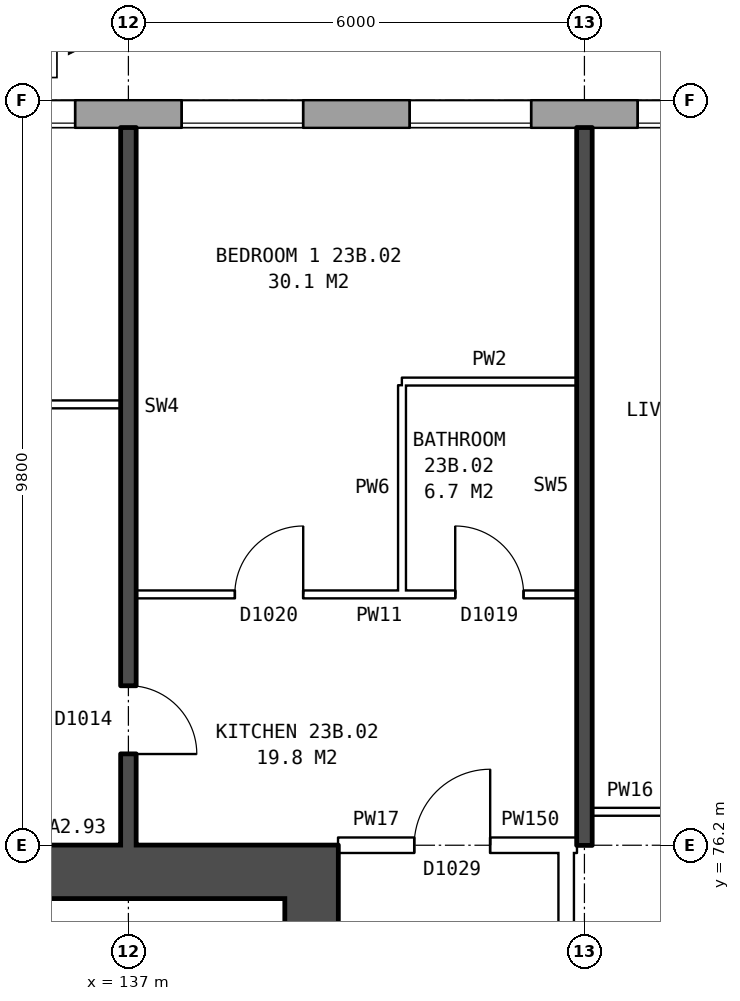
"""IFC4 building model, lengths in metres.
Left out: names, types, materials, properties, quantities, classifications, styles, units other than length and angle.
Written with IfcOpenShell. Run it as: python <this file> out.ifc"""

import sys

from ifc_helpers import new_model, si_unit, direction, frame, frame_2d, origin, place, context, subcontext, project, spatial, rectangle, extrude, element, fill, save


model = new_model("IFC4")
c1 = context("Model", 3, precision=1e-05, world=origin(), true_north=direction((0.0, 1.0)))
c2 = subcontext(c1, "Body", "Model", "MODEL_VIEW")
j1 = project(units=[si_unit("LENGTHUNIT", "METRE"), si_unit("PLANEANGLEUNIT", "RADIAN")], contexts=[c1])
p1 = place(None, origin())
s1 = spatial("IfcSite", under=j1, at=p1, CompositionType="ELEMENT")
p2 = place(p1, origin())
s2 = spatial("IfcBuilding", under=s1, at=p2, CompositionType="ELEMENT")
p3 = place(p2, frame((0.0, 0.0, 84.0)))
s3 = spatial("IfcBuildingStorey", under=s2, at=p3, CompositionType="ELEMENT", Elevation=84.0)
p4 = place(p3, frame((172.175, 85.82, 0.0), z_axis=(0.0, 0.0, 1.0), x_axis=(-1.0, 0.0, 0.0)))
e1 = element("IfcWall", 1, at=p4, inside=s3, PredefinedType="STANDARD", context=c2, shape_type="SweptSolid", body=[
    extrude(rectangle(XDim=38.101, YDim=0.36, at=frame_2d((19.05, 0.0))), origin(), (0.0, 0.0, 1.0), 2.85),
])
p5 = place(p4, frame((2.875, 0.0, 0.8)))
e2 = element("IfcOpeningElement", 2, at=p5, cuts=e1, PredefinedType="OPENING", context=c2, shape_type="SweptSolid", body=[
    extrude(rectangle(XDim=1.6, YDim=1.8, at=frame_2d((0.8, 0.9))), frame((0.0, 0.19, 0.0), z_axis=(0.0, -1.0, 0.0), x_axis=(1.0, 0.0, 0.0)), (0.0, 0.0, 1.0), 0.38),
])
p6 = place(p4, frame((5.875, 0.0, 0.8)))
e3 = element("IfcOpeningElement", 3, at=p6, cuts=e1, PredefinedType="OPENING", context=c2, shape_type="SweptSolid", body=[
    extrude(rectangle(XDim=1.6, YDim=1.8, at=frame_2d((0.8, 0.9))), frame((0.0, 0.19, 0.0), z_axis=(0.0, -1.0, 0.0), x_axis=(1.0, 0.0, 0.0)), (0.0, 0.0, 1.0), 0.38),
])
p7 = place(p4, frame((8.875, 0.0, 0.8)))
e4 = element("IfcOpeningElement", 4, at=p7, cuts=e1, PredefinedType="OPENING", context=c2, shape_type="SweptSolid", body=[
    extrude(rectangle(XDim=1.6, YDim=1.8, at=frame_2d((0.8, 0.9))), frame((0.0, 0.19, 0.0), z_axis=(0.0, -1.0, 0.0), x_axis=(1.0, 0.0, 0.0)), (0.0, 0.0, 1.0), 0.38),
])
p8 = place(p4, frame((11.875, 0.0, 0.8)))
e5 = element("IfcOpeningElement", 5, at=p8, cuts=e1, PredefinedType="OPENING", context=c2, shape_type="SweptSolid", body=[
    extrude(rectangle(XDim=1.6, YDim=1.8, at=frame_2d((0.8, 0.9))), frame((0.0, 0.19, 0.0), z_axis=(0.0, -1.0, 0.0), x_axis=(1.0, 0.0, 0.0)), (0.0, 0.0, 1.0), 0.38),
])
p9 = place(p4, frame((13.775, 0.0, 1.6)))
e6 = element("IfcOpeningElement", 6, at=p9, cuts=e1, PredefinedType="OPENING", context=c2, shape_type="SweptSolid", body=[
    extrude(rectangle(XDim=0.6, YDim=0.9, at=frame_2d((0.3, 0.45))), frame((0.0, 0.19, 0.0), z_axis=(0.0, -1.0, 0.0), x_axis=(1.0, 0.0, 0.0)), (0.0, 0.0, 1.0), 0.38),
])
p10 = place(p4, frame((17.875, 0.0, 0.8)))
e7 = element("IfcOpeningElement", 7, at=p10, cuts=e1, PredefinedType="OPENING", context=c2, shape_type="SweptSolid", body=[
    extrude(rectangle(XDim=1.6, YDim=1.8, at=frame_2d((0.8, 0.9))), frame((0.0, 0.19, 0.0), z_axis=(0.0, -1.0, 0.0), x_axis=(1.0, 0.0, 0.0)), (0.0, 0.0, 1.0), 0.38),
])
p11 = place(p4, frame((20.325, 0.0, 0.65)))
e8 = element("IfcOpeningElement", 8, at=p11, cuts=e1, PredefinedType="OPENING", context=c2, shape_type="SweptSolid", body=[
    extrude(rectangle(XDim=1.4, YDim=1.8, at=frame_2d((0.7, 0.9))), frame((0.0, 0.19, 0.0), z_axis=(0.0, -1.0, 0.0), x_axis=(1.0, 0.0, 0.0)), (0.0, 0.0, 1.0), 0.38),
])
p12 = place(p4, frame((23.625, 0.0, 1.7)))
e9 = element("IfcOpeningElement", 9, at=p12, cuts=e1, PredefinedType="OPENING", context=c2, shape_type="SweptSolid", body=[
    extrude(rectangle(XDim=0.6, YDim=0.9, at=frame_2d((0.3, 0.45))), frame((0.0, 0.19, 0.0), z_axis=(0.0, -1.0, 0.0), x_axis=(1.0, 0.0, 0.0)), (0.0, 0.0, 1.0), 0.38),
])
p13 = place(p4, frame((26.875, 0.0, 0.8)))
e10 = element("IfcOpeningElement", 10, at=p13, cuts=e1, PredefinedType="OPENING", context=c2, shape_type="SweptSolid", body=[
    extrude(rectangle(XDim=1.6, YDim=1.8, at=frame_2d((0.8, 0.9))), frame((0.0, 0.19, 0.0), z_axis=(0.0, -1.0, 0.0), x_axis=(1.0, 0.0, 0.0)), (0.0, 0.0, 1.0), 0.38),
])
p14 = place(p4, frame((29.875, 0.0, 0.8)))
e11 = element("IfcOpeningElement", 11, at=p14, cuts=e1, PredefinedType="OPENING", context=c2, shape_type="SweptSolid", body=[
    extrude(rectangle(XDim=1.6, YDim=1.8, at=frame_2d((0.8, 0.9))), frame((0.0, 0.19, 0.0), z_axis=(0.0, -1.0, 0.0), x_axis=(1.0, 0.0, 0.0)), (0.0, 0.0, 1.0), 0.38),
])
p15 = place(p4, frame((32.875, 0.0, 0.8)))
e12 = element("IfcOpeningElement", 12, at=p15, cuts=e1, PredefinedType="OPENING", context=c2, shape_type="SweptSolid", body=[
    extrude(rectangle(XDim=1.6, YDim=1.8, at=frame_2d((0.8, 0.9))), frame((0.0, 0.19, 0.0), z_axis=(0.0, -1.0, 0.0), x_axis=(1.0, 0.0, 0.0)), (0.0, 0.0, 1.0), 0.38),
])
p16 = place(p4, frame((35.875, 0.0, 0.8)))
e13 = element("IfcOpeningElement", 13, at=p16, cuts=e1, PredefinedType="OPENING", context=c2, shape_type="SweptSolid", body=[
    extrude(rectangle(XDim=1.6, YDim=1.8, at=frame_2d((0.8, 0.9))), frame((0.0, 0.19, 0.0), z_axis=(0.0, -1.0, 0.0), x_axis=(1.0, 0.0, 0.0)), (0.0, 0.0, 1.0), 0.38),
])
p17 = place(p4, frame((15.925, 0.0, 0.8)))
e14 = element("IfcOpeningElement", 14, at=p17, cuts=e1, PredefinedType="OPENING", context=c2, shape_type="SweptSolid", body=[
    extrude(rectangle(XDim=1.0, YDim=1.2, at=frame_2d((0.5, 0.6))), frame((0.0, 0.19, 0.0), z_axis=(0.0, -1.0, 0.0), x_axis=(1.0, 0.0, 0.0)), (0.0, 0.0, 1.0), 0.38),
])
p18 = place(p4, frame((22.025, 0.0, 0.65)))
e15 = element("IfcOpeningElement", 15, at=p18, cuts=e1, PredefinedType="OPENING", context=c2, shape_type="SweptSolid", body=[
    extrude(rectangle(XDim=0.6, YDim=0.9, at=frame_2d((0.3, 0.45))), frame((0.0, 0.19, 0.0), z_axis=(0.0, -1.0, 0.0), x_axis=(1.0, 0.0, 0.0)), (0.0, 0.0, 1.0), 0.38),
])
p19 = place(p4, frame((24.525, 0.0, 0.8)))
e16 = element("IfcOpeningElement", 16, at=p19, cuts=e1, PredefinedType="OPENING", context=c2, shape_type="SweptSolid", body=[
    extrude(rectangle(XDim=1.4, YDim=1.8, at=frame_2d((0.7, 0.9))), frame((0.0, 0.19, 0.0), z_axis=(0.0, -1.0, 0.0), x_axis=(1.0, 0.0, 0.0)), (0.0, 0.0, 1.0), 0.38),
])
p20 = place(p3, frame((139.41, 64.5, 0.0), z_axis=(0.0, 0.0, 1.0), x_axis=(0.0, 1.0, 0.0)))
e17 = element("IfcWall", 17, at=p20, inside=s3, PredefinedType="SHEAR", context=c2, shape_type="SweptSolid", body=[
    extrude(rectangle(XDim=11.0, YDim=0.7, at=frame_2d((5.5, 0.0))), origin(), (0.0, 0.0, 1.0), 2.85),
])
p21 = place(p20, frame((0.625, 0.0, 0.0)))
e18 = element("IfcOpeningElement", 18, at=p21, cuts=e17, PredefinedType="OPENING", context=c2, shape_type="SweptSolid", body=[
    extrude(rectangle(XDim=1.1, YDim=2.1, at=frame_2d((0.55, 1.05))), frame((0.0, 0.36, 0.0), z_axis=(0.0, -1.0, 0.0), x_axis=(1.0, 0.0, 0.0)), (0.0, 0.0, 1.0), 0.72),
])
p22 = place(p20, frame((9.2, 0.0, 0.0)))
e19 = element("IfcOpeningElement", 19, at=p22, cuts=e17, PredefinedType="OPENING", context=c2, shape_type="SweptSolid", body=[
    extrude(rectangle(XDim=1.1, YDim=2.1, at=frame_2d((0.55, 1.05))), frame((0.0, 0.36, 0.0), z_axis=(0.0, -1.0, 0.0), x_axis=(1.0, 0.0, 0.0)), (0.0, 0.0, 1.0), 0.72),
])
p23 = place(p20, frame((7.425, 0.0, 0.0)))
e20 = element("IfcOpeningElement", 20, at=p23, cuts=e17, PredefinedType="OPENING", context=c2, shape_type="SweptSolid", body=[
    extrude(rectangle(XDim=0.85, YDim=2.1, at=frame_2d((0.425, 1.05))), frame((0.0, 0.36, 0.0), z_axis=(0.0, -1.0, 0.0), x_axis=(1.0, 0.0, 0.0)), (0.0, 0.0, 1.0), 0.72),
])
p24 = place(p3, frame((139.76, 75.85, 0.0), z_axis=(0.0, 0.0, 1.0), x_axis=(-1.0, 0.0, 0.0)))
e21 = element("IfcWall", 21, at=p24, inside=s3, PredefinedType="SHEAR", context=c2, shape_type="SweptSolid", body=[
    extrude(rectangle(XDim=8.4, YDim=0.7, at=frame_2d((4.2, 0.0))), origin(), (0.0, 0.0, 1.0), 2.85),
])
p25 = place(p3, frame((142.76, 63.9, 0.0), z_axis=(0.0, 0.0, 1.0), x_axis=(0.0, 1.0, 0.0)))
e22 = element("IfcWall", 22, at=p25, inside=s3, PredefinedType="PARTITIONING", context=c2, shape_type="SweptSolid", body=[
    extrude(rectangle(XDim=12.2, YDim=0.2, at=frame_2d((6.1, 0.0))), origin(), (0.0, 0.0, 1.0), 2.85),
])
p26 = place(p25, frame((5.1, 0.0, 0.0)))
e23 = element("IfcOpeningElement", 23, at=p26, cuts=e22, PredefinedType="OPENING", context=c2, shape_type="SweptSolid", body=[
    extrude(rectangle(XDim=2.0, YDim=2.1, at=frame_2d((1.0, 1.05))), frame((0.0, 0.11, 0.0), z_axis=(0.0, -1.0, 0.0), x_axis=(1.0, 0.0, 0.0)), (0.0, 0.0, 1.0), 0.22),
])
p27 = place(p3, frame((139.76, 76.2, 0.0), z_axis=(0.0, 0.0, 1.0), x_axis=(1.0, 0.0, 0.0)))
e24 = element("IfcWall", 24, at=p27, inside=s3, PredefinedType="PARTITIONING", context=c2, shape_type="SweptSolid", body=[
    extrude(rectangle(XDim=3.0, YDim=0.2, at=frame_2d((1.5, 0.0))), origin(), (0.0, 0.0, 1.0), 2.85),
])
p28 = place(p27, frame((1.0, 0.0, 0.0)))
e25 = element("IfcOpeningElement", 25, at=p28, cuts=e24, PredefinedType="OPENING", context=c2, shape_type="SweptSolid", body=[
    extrude(rectangle(XDim=1.0, YDim=2.1, at=frame_2d((0.5, 1.05))), frame((0.0, 0.11, 0.0), z_axis=(0.0, -1.0, 0.0), x_axis=(1.0, 0.0, 0.0)), (0.0, 0.0, 1.0), 0.22),
])
p29 = place(p3, frame((142.76, 76.2, 0.0), z_axis=(0.0, 0.0, 1.0), x_axis=(1.0, 0.0, 0.0)))
e26 = element("IfcWall", 26, at=p29, inside=s3, PredefinedType="PARTITIONING", context=c2, shape_type="SweptSolid", body=[
    extrude(rectangle(XDim=0.14, YDim=0.2, at=frame_2d((0.07, 0.0))), origin(), (0.0, 0.0, 1.0), 2.85),
])
p30 = place(p3, frame((143.1, 76.64, 0.0), z_axis=(0.0, 0.0, 1.0), x_axis=(1.0, 0.0, 0.0)))
e27 = element("IfcWall", 27, at=p30, inside=s3, PredefinedType="PARTITIONING", context=c2, shape_type="SweptSolid", body=[
    extrude(rectangle(XDim=2.9, YDim=0.1, at=frame_2d((1.45, 0.0))), origin(), (0.0, 0.0, 1.0), 2.85),
])
p31 = place(p30, frame((1.0, 0.0, 0.0)))
e28 = element("IfcOpeningElement", 28, at=p31, cuts=e27, PredefinedType="OPENING", context=c2, shape_type="SweptSolid", body=[
    extrude(rectangle(XDim=0.9, YDim=2.1, at=frame_2d((0.45, 1.05))), frame((0.0, 0.06, 0.0), z_axis=(0.0, -1.0, 0.0), x_axis=(1.0, 0.0, 0.0)), (0.0, 0.0, 1.0), 0.12),
])
p32 = place(p3, frame((137.1, 79.5, 0.0), z_axis=(0.0, 0.0, 1.0), x_axis=(1.0, 0.0, 0.0)))
e29 = element("IfcWall", 29, at=p32, inside=s3, PredefinedType="PARTITIONING", context=c2, shape_type="SweptSolid", body=[
    extrude(rectangle(XDim=5.8, YDim=0.1, at=frame_2d((2.9, 0.0))), origin(), (0.0, 0.0, 1.0), 2.85),
])
p33 = place(p32, frame((1.3, 0.0, 0.0)))
e30 = element("IfcOpeningElement", 30, at=p33, cuts=e29, PredefinedType="OPENING", context=c2, shape_type="SweptSolid", body=[
    extrude(rectangle(XDim=0.9, YDim=2.1, at=frame_2d((0.45, 1.05))), frame((0.0, 0.06, 0.0), z_axis=(0.0, -1.0, 0.0), x_axis=(1.0, 0.0, 0.0)), (0.0, 0.0, 1.0), 0.12),
])
p34 = place(p32, frame((4.2, 0.0, 0.0)))
e31 = element("IfcOpeningElement", 31, at=p34, cuts=e29, PredefinedType="OPENING", context=c2, shape_type="SweptSolid", body=[
    extrude(rectangle(XDim=0.9, YDim=2.1, at=frame_2d((0.45, 1.05))), frame((0.0, 0.06, 0.0), z_axis=(0.0, -1.0, 0.0), x_axis=(1.0, 0.0, 0.0)), (0.0, 0.0, 1.0), 0.12),
])
p35 = place(p3, frame((131.36, 82.0, 0.0), z_axis=(0.0, 0.0, 1.0), x_axis=(1.0, 0.0, 0.0)))
e32 = element("IfcWall", 32, at=p35, inside=s3, PredefinedType="PARTITIONING", context=c2, shape_type="SweptSolid", body=[
    extrude(rectangle(XDim=5.54, YDim=0.1, at=frame_2d((2.77, 0.0))), origin(), (0.0, 0.0, 1.0), 2.85),
])
p36 = place(p35, frame((2.32, 0.0, 0.0)))
e33 = element("IfcOpeningElement", 33, at=p36, cuts=e32, PredefinedType="OPENING", context=c2, shape_type="SweptSolid", body=[
    extrude(rectangle(XDim=0.9, YDim=2.1, at=frame_2d((0.45, 1.05))), frame((0.0, 0.06, 0.0), z_axis=(0.0, -1.0, 0.0), x_axis=(1.0, 0.0, 0.0)), (0.0, 0.0, 1.0), 0.12),
])
p37 = place(p3, frame((140.6, 82.3, 0.0), z_axis=(0.0, 0.0, 1.0), x_axis=(1.0, 0.0, 0.0)))
e34 = element("IfcWall", 34, at=p37, inside=s3, PredefinedType="PARTITIONING", context=c2, shape_type="SweptSolid", body=[
    extrude(rectangle(XDim=2.3, YDim=0.1, at=frame_2d((1.15, 0.0))), origin(), (0.0, 0.0, 1.0), 2.85),
])
p38 = place(p3, frame((137.0, 76.2, 0.0), z_axis=(0.0, 0.0, 1.0), x_axis=(0.0, 1.0, 0.0)))
e35 = element("IfcWall", 35, at=p38, inside=s3, PredefinedType="SOLIDWALL", context=c2, shape_type="SweptSolid", body=[
    extrude(rectangle(XDim=9.44, YDim=0.2, at=frame_2d((4.72, 0.0))), origin(), (0.0, 0.0, 1.0), 2.85),
])
p39 = place(p38, frame((1.2, 0.0, 0.0)))
e36 = element("IfcOpeningElement", 36, at=p39, cuts=e35, PredefinedType="OPENING", context=c2, shape_type="SweptSolid", body=[
    extrude(rectangle(XDim=0.9, YDim=2.1, at=frame_2d((0.45, 1.05))), frame((0.0, 0.11, 0.0), z_axis=(0.0, -1.0, 0.0), x_axis=(1.0, 0.0, 0.0)), (0.0, 0.0, 1.0), 0.22),
])
p40 = place(p3, frame((140.6, 79.55, 0.0), z_axis=(0.0, 0.0, 1.0), x_axis=(0.0, 1.0, 0.0)))
e37 = element("IfcWall", 37, at=p40, inside=s3, PredefinedType="PARTITIONING", context=c2, shape_type="SweptSolid", body=[
    extrude(rectangle(XDim=2.7, YDim=0.1, at=frame_2d((1.35, 0.0))), origin(), (0.0, 0.0, 1.0), 2.85),
])
p41 = place(p3, frame((143.0, 76.2, 0.0), z_axis=(0.0, 0.0, 1.0), x_axis=(0.0, 1.0, 0.0)))
e38 = element("IfcWall", 38, at=p41, inside=s3, PredefinedType="SOLIDWALL", context=c2, shape_type="SweptSolid", body=[
    extrude(rectangle(XDim=9.44, YDim=0.2, at=frame_2d((4.72, 0.0))), origin(), (0.0, 0.0, 1.0), 2.85),
])
p42 = place(p13, origin())
e39 = element("IfcWindow", 39, at=p42, inside=s3, PartitioningType="SINGLE_PANEL", PredefinedType="WINDOW", context=c2, shape_type="SweptSolid", body=[
    extrude(rectangle(XDim=1.6, YDim=1.8, at=frame_2d((0.8, 0.9))), frame((0.0, 0.15, 0.0), z_axis=(0.0, -1.0, 0.0), x_axis=(1.0, 0.0, 0.0)), (0.0, 0.0, 1.0), 0.06),
])
fill(e10, e39)
p43 = place(p14, origin())
e40 = element("IfcWindow", 40, at=p43, inside=s3, PartitioningType="SINGLE_PANEL", PredefinedType="WINDOW", context=c2, shape_type="SweptSolid", body=[
    extrude(rectangle(XDim=1.6, YDim=1.8, at=frame_2d((0.8, 0.9))), frame((0.0, 0.15, 0.0), z_axis=(0.0, -1.0, 0.0), x_axis=(1.0, 0.0, 0.0)), (0.0, 0.0, 1.0), 0.06),
])
fill(e11, e40)
p44 = place(p15, origin())
e41 = element("IfcWindow", 41, at=p44, inside=s3, PartitioningType="SINGLE_PANEL", PredefinedType="WINDOW", context=c2, shape_type="SweptSolid", body=[
    extrude(rectangle(XDim=1.6, YDim=1.8, at=frame_2d((0.8, 0.9))), frame((0.0, 0.15, 0.0), z_axis=(0.0, -1.0, 0.0), x_axis=(1.0, 0.0, 0.0)), (0.0, 0.0, 1.0), 0.06),
])
fill(e12, e41)
p45 = place(p16, origin())
e42 = element("IfcWindow", 42, at=p45, inside=s3, PartitioningType="SINGLE_PANEL", PredefinedType="WINDOW", context=c2, shape_type="SweptSolid", body=[
    extrude(rectangle(XDim=1.6, YDim=1.8, at=frame_2d((0.8, 0.9))), frame((0.0, 0.15, 0.0), z_axis=(0.0, -1.0, 0.0), x_axis=(1.0, 0.0, 0.0)), (0.0, 0.0, 1.0), 0.06),
])
fill(e13, e42)
p46 = place(p33, origin())
e43 = element("IfcDoor", 43, at=p46, inside=s3, OperationType="SINGLE_SWING_RIGHT", PredefinedType="DOOR", context=c2, shape_type="SweptSolid", body=[
    extrude(rectangle(XDim=0.9, YDim=2.1, at=frame_2d((0.45, 1.05))), frame((0.0, 0.025, 0.0), z_axis=(0.0, -1.0, 0.0), x_axis=(1.0, 0.0, 0.0)), (0.0, 0.0, 1.0), 0.05),
])
fill(e30, e43)
p47 = place(p28, origin())
e44 = element("IfcDoor", 44, at=p47, inside=s3, OperationType="SINGLE_SWING_RIGHT", PredefinedType="DOOR", context=c2, shape_type="SweptSolid", body=[
    extrude(rectangle(XDim=1.0, YDim=2.1, at=frame_2d((0.5, 1.05))), frame((0.0, 0.025, 0.0), z_axis=(0.0, -1.0, 0.0), x_axis=(1.0, 0.0, 0.0)), (0.0, 0.0, 1.0), 0.05),
])
fill(e25, e44)
p48 = place(p39, frame((0.9, 0.0, 0.0), z_axis=(0.0, 0.0, 1.0), x_axis=(-1.0, 0.0, 0.0)))
e45 = element("IfcDoor", 45, at=p48, inside=s3, OperationType="SINGLE_SWING_RIGHT", PredefinedType="DOOR", context=c2, shape_type="SweptSolid", body=[
    extrude(rectangle(XDim=0.9, YDim=2.1, at=frame_2d((0.45, 1.05))), frame((0.0, 0.025, 0.0), z_axis=(0.0, -1.0, 0.0), x_axis=(1.0, 0.0, 0.0)), (0.0, 0.0, 1.0), 0.05),
])
fill(e36, e45)
p49 = place(p34, origin())
e46 = element("IfcDoor", 46, at=p49, inside=s3, OperationType="SINGLE_SWING_LEFT", PredefinedType="DOOR", context=c2, shape_type="SweptSolid", body=[
    extrude(rectangle(XDim=0.9, YDim=2.1, at=frame_2d((0.45, 1.05))), frame((0.0, 0.025, 0.0), z_axis=(0.0, -1.0, 0.0), x_axis=(1.0, 0.0, 0.0)), (0.0, 0.0, 1.0), 0.05),
])
fill(e31, e46)
save(model, sys.argv[1])
